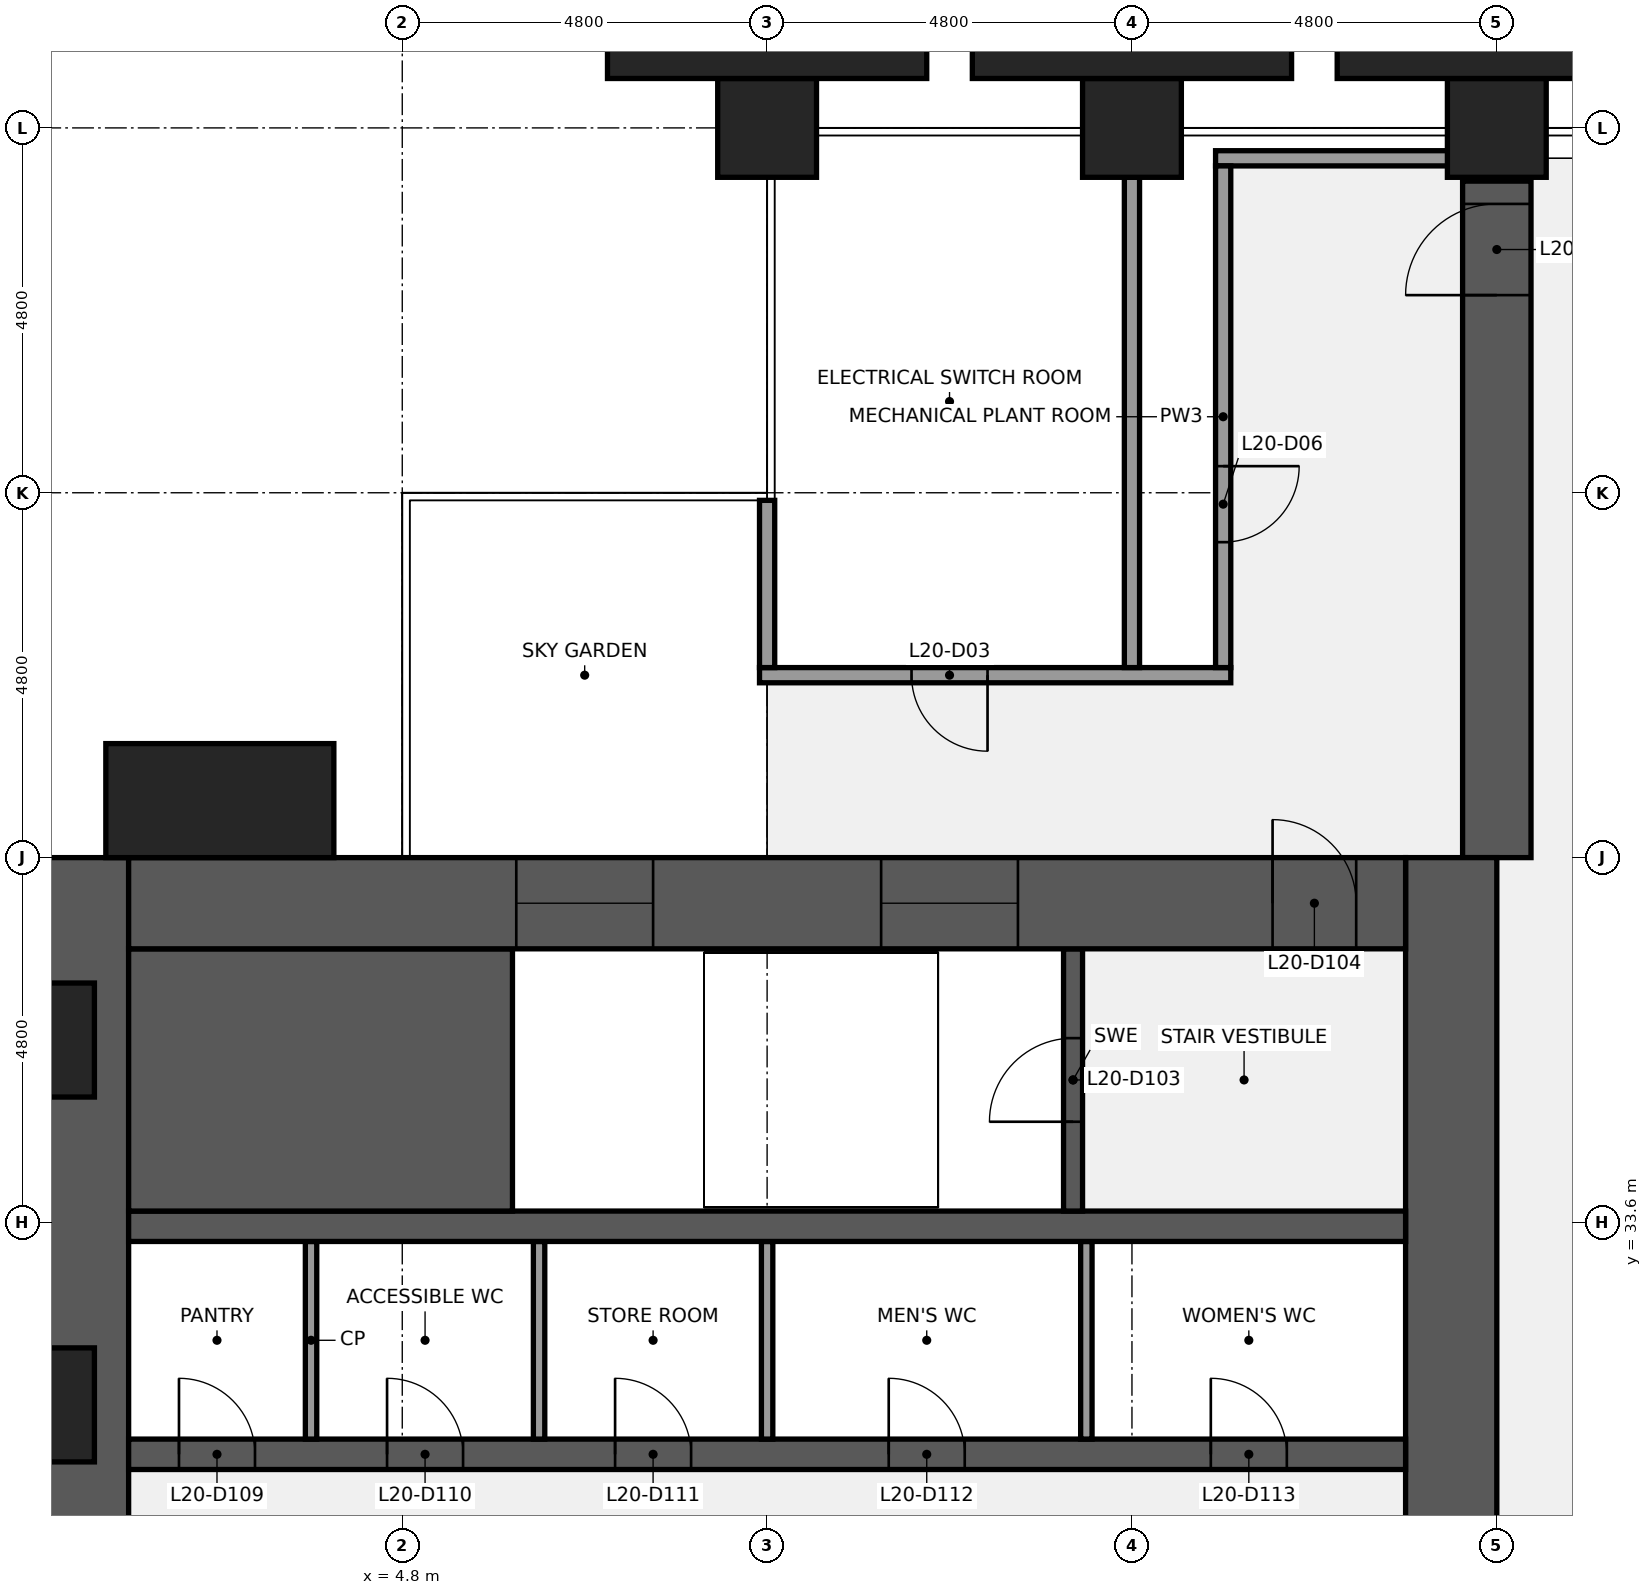
"""IFC4 building model, lengths in metres.
Left out: names, types, materials, properties, quantities, classifications, styles, units other than length and angle.
Written with IfcOpenShell. Run it as: python <this file> out.ifc"""

import sys

from ifc_helpers import new_model, si_unit, direction, frame, frame_2d, origin, origin_2d, place, context, subcontext, project, spatial, rectangle, extrude, element, fill, save


model = new_model("IFC4")
c1 = context("Model", 3, precision=1e-05, world=origin(), true_north=direction((0.0, 1.0)))
c2 = subcontext(c1, "Body", "Model", "MODEL_VIEW")
j1 = project(units=[si_unit("LENGTHUNIT", "METRE"), si_unit("PLANEANGLEUNIT", "RADIAN")], contexts=[c1])
p1 = place(None, origin())
s1 = spatial("IfcSite", under=j1, at=p1, CompositionType="ELEMENT")
p2 = place(p1, origin())
s2 = spatial("IfcBuilding", under=s1, at=p2, CompositionType="ELEMENT")
p3 = place(p2, frame((0.0, 0.0, 91.5)))
s3 = spatial("IfcBuildingStorey", under=s2, at=p3, CompositionType="ELEMENT", Elevation=91.5)
for number, where, z_axis, x_axis in (
    (1, (9.6, 48.0, 0.0), (0.0, 0.0, 1.0), (1.0, 0.0, 0.0)),
    (2, (14.4, 48.0, 0.0), (0.0, 0.0, 1.0), (1.0, 0.0, 0.0)),
    (3, (19.2, 48.0, 0.0), (0.0, 0.0, 1.0), (1.0, 0.0, 0.0)),
):
    element("IfcColumn", number, at=place(p3, frame(where, z_axis=z_axis, x_axis=x_axis)), inside=s3, PredefinedType="COLUMN", context=c2, shape_type="SweptSolid", body=[
        extrude(rectangle(XDim=1.3, YDim=1.3, at=origin_2d()), origin(), (0.0, 0.0, 1.0), 12.6),
    ])
p4 = place(p3, frame((19.2, 38.4, 0.0), z_axis=(0.0, 0.0, 1.0), x_axis=(0.0, 1.0, 0.0)))
e4 = element("IfcWall", 4, at=p4, inside=s3, PredefinedType="SHEAR", context=c2, shape_type="SweptSolid", body=[
    extrude(rectangle(XDim=8.9, YDim=0.9, at=frame_2d((4.45, 0.0))), origin(), (0.0, 0.0, 1.0), 12.3),
])
p5 = place(p4, frame((7.4, 0.0, 0.0)))
e5 = element("IfcOpeningElement", 5, at=p5, cuts=e4, PredefinedType="OPENING", context=c2, shape_type="SweptSolid", body=[
    extrude(rectangle(XDim=1.2, YDim=2.1, at=frame_2d((0.6, 1.05))), frame((0.0, 0.46, 0.0), z_axis=(0.0, -1.0, 0.0), x_axis=(1.0, 0.0, 0.0)), (0.0, 0.0, 1.0), 0.92),
])
p6 = place(p3, frame((0.6, 9.6, 0.0), z_axis=(0.0, 0.0, 1.0), x_axis=(0.0, 1.0, 0.0)))
e6 = element("IfcWall", 6, at=p6, inside=s3, PredefinedType="SHEAR", context=c2, shape_type="SweptSolid", body=[
    extrude(rectangle(XDim=28.8, YDim=1.2, at=frame_2d((14.4, 0.0))), origin(), (0.0, 0.0, 1.0), 12.3),
])
p7 = place(p6, frame((8.85, 0.0, 0.9)))
e7 = element("IfcOpeningElement", 7, at=p7, cuts=e6, PredefinedType="OPENING", context=c2, shape_type="SweptSolid", body=[
    extrude(rectangle(XDim=1.5, YDim=6.3, at=frame_2d((0.75, 3.15))), frame((0.0, 0.61, 0.0), z_axis=(0.0, -1.0, 0.0), x_axis=(1.0, 0.0, 0.0)), (0.0, 0.0, 1.0), 1.22),
])
p8 = place(p6, frame((18.45, 0.0, 0.9)))
e8 = element("IfcOpeningElement", 8, at=p8, cuts=e6, PredefinedType="OPENING", context=c2, shape_type="SweptSolid", body=[
    extrude(rectangle(XDim=1.5, YDim=6.3, at=frame_2d((0.75, 3.15))), frame((0.0, 0.61, 0.0), z_axis=(0.0, -1.0, 0.0), x_axis=(1.0, 0.0, 0.0)), (0.0, 0.0, 1.0), 1.22),
])
p9 = place(p3, frame((18.6, 38.4, 0.0), z_axis=(0.0, 0.0, 1.0), x_axis=(0.0, -1.0, 0.0)))
e9 = element("IfcWall", 9, at=p9, inside=s3, PredefinedType="SHEAR", context=c2, shape_type="SweptSolid", body=[
    extrude(rectangle(XDim=28.8, YDim=1.2, at=frame_2d((14.4, 0.0))), origin(), (0.0, 0.0, 1.0), 12.3),
])
p10 = place(p9, frame((18.3, 0.0, 0.0)))
e10 = element("IfcOpeningElement", 10, at=p10, cuts=e9, PredefinedType="OPENING", context=c2, shape_type="SweptSolid", body=[
    extrude(rectangle(XDim=1.8, YDim=2.1, at=frame_2d((0.9, 1.05))), frame((0.0, 0.61, 0.0), z_axis=(0.0, -1.0, 0.0), x_axis=(1.0, 0.0, 0.0)), (0.0, 0.0, 1.0), 1.22),
])
p11 = place(p9, frame((8.7, 0.0, 0.0)))
e11 = element("IfcOpeningElement", 11, at=p11, cuts=e9, PredefinedType="OPENING", context=c2, shape_type="SweptSolid", body=[
    extrude(rectangle(XDim=1.8, YDim=2.1, at=frame_2d((0.9, 1.05))), frame((0.0, 0.61, 0.0), z_axis=(0.0, -1.0, 0.0), x_axis=(1.0, 0.0, 0.0)), (0.0, 0.0, 1.0), 1.22),
])
p12 = place(p3, frame((1.2, 30.55, 0.0), z_axis=(0.0, 0.0, 1.0), x_axis=(1.0, 0.0, 0.0)))
e12 = element("IfcWall", 12, at=p12, inside=s3, PredefinedType="SHEAR", context=c2, shape_type="SweptSolid", body=[
    extrude(rectangle(XDim=16.8, YDim=0.4, at=frame_2d((8.4, 0.0))), origin(), (0.0, 0.0, 1.0), 12.3),
])
p13 = place(p12, frame((0.663, 0.0, 0.0)))
e13 = element("IfcOpeningElement", 13, at=p13, cuts=e12, PredefinedType="OPENING", context=c2, shape_type="SweptSolid", body=[
    extrude(rectangle(XDim=1.0, YDim=2.1, at=frame_2d((0.5, 1.05))), frame((0.0, 0.21, 0.0), z_axis=(0.0, -1.0, 0.0), x_axis=(1.0, 0.0, 0.0)), (0.0, 0.0, 1.0), 0.42),
])
p14 = place(p12, frame((3.4, 0.0, 0.0)))
e14 = element("IfcOpeningElement", 14, at=p14, cuts=e12, PredefinedType="OPENING", context=c2, shape_type="SweptSolid", body=[
    extrude(rectangle(XDim=1.0, YDim=2.1, at=frame_2d((0.5, 1.05))), frame((0.0, 0.21, 0.0), z_axis=(0.0, -1.0, 0.0), x_axis=(1.0, 0.0, 0.0)), (0.0, 0.0, 1.0), 0.42),
])
p15 = place(p12, frame((6.4, 0.0, 0.0)))
e15 = element("IfcOpeningElement", 15, at=p15, cuts=e12, PredefinedType="OPENING", context=c2, shape_type="SweptSolid", body=[
    extrude(rectangle(XDim=1.0, YDim=2.1, at=frame_2d((0.5, 1.05))), frame((0.0, 0.21, 0.0), z_axis=(0.0, -1.0, 0.0), x_axis=(1.0, 0.0, 0.0)), (0.0, 0.0, 1.0), 0.42),
])
p16 = place(p12, frame((10.0, 0.0, 0.0)))
e16 = element("IfcOpeningElement", 16, at=p16, cuts=e12, PredefinedType="OPENING", context=c2, shape_type="SweptSolid", body=[
    extrude(rectangle(XDim=1.0, YDim=2.1, at=frame_2d((0.5, 1.05))), frame((0.0, 0.21, 0.0), z_axis=(0.0, -1.0, 0.0), x_axis=(1.0, 0.0, 0.0)), (0.0, 0.0, 1.0), 0.42),
])
p17 = place(p12, frame((14.238, 0.0, 0.0)))
e17 = element("IfcOpeningElement", 17, at=p17, cuts=e12, PredefinedType="OPENING", context=c2, shape_type="SweptSolid", body=[
    extrude(rectangle(XDim=1.0, YDim=2.1, at=frame_2d((0.5, 1.05))), frame((0.0, 0.21, 0.0), z_axis=(0.0, -1.0, 0.0), x_axis=(1.0, 0.0, 0.0)), (0.0, 0.0, 1.0), 0.42),
])
for number, where, z_axis, x_axis in (
    (18, (3.6, 30.75, 0.0), (0.0, 0.0, 1.0), (0.0, 1.0, 0.0)),
    (19, (6.6, 30.75, 0.0), (0.0, 0.0, 1.0), (0.0, 1.0, 0.0)),
    (20, (9.6, 30.75, 0.0), (0.0, 0.0, 1.0), (0.0, 1.0, 0.0)),
    (21, (13.8, 30.75, 0.0), (0.0, 0.0, 1.0), (0.0, 1.0, 0.0)),
):
    element("IfcWall", number, at=place(p3, frame(where, z_axis=z_axis, x_axis=x_axis)), inside=s3, PredefinedType="PARTITIONING", context=c2, shape_type="SweptSolid", body=[
        extrude(rectangle(XDim=2.6, YDim=0.15, at=frame_2d((1.3, 0.0))), origin(), (0.0, 0.0, 1.0), 12.3),
    ])
p18 = place(p3, frame((1.2, 33.55, 0.0), z_axis=(0.0, 0.0, 1.0), x_axis=(1.0, 0.0, 0.0)))
e22 = element("IfcWall", 22, at=p18, inside=s3, PredefinedType="SHEAR", context=c2, shape_type="SweptSolid", body=[
    extrude(rectangle(XDim=16.8, YDim=0.4, at=frame_2d((8.4, 0.0))), origin(), (0.0, 0.0, 1.0), 12.3),
])
p19 = place(p3, frame((1.2, 35.475, 0.0), z_axis=(0.0, 0.0, 1.0), x_axis=(1.0, 0.0, 0.0)))
e23 = element("IfcWall", 23, at=p19, inside=s3, PredefinedType="SHEAR", context=c2, shape_type="SweptSolid", body=[
    extrude(rectangle(XDim=5.05, YDim=3.45, at=frame_2d((2.525, 0.0))), origin(), (0.0, 0.0, 1.0), 12.3),
])
p20 = place(p3, frame((13.625, 33.75, 0.0), z_axis=(0.0, 0.0, 1.0), x_axis=(0.0, 1.0, 0.0)))
e24 = element("IfcWall", 24, at=p20, inside=s3, PredefinedType="SHEAR", context=c2, shape_type="SweptSolid", body=[
    extrude(rectangle(XDim=3.45, YDim=0.25, at=frame_2d((1.725, 0.0))), origin(), (0.0, 0.0, 1.0), 12.3),
])
p21 = place(p20, frame((1.175, 0.0, 0.0)))
e25 = element("IfcOpeningElement", 25, at=p21, cuts=e24, PredefinedType="OPENING", context=c2, shape_type="SweptSolid", body=[
    extrude(rectangle(XDim=1.1, YDim=2.1, at=frame_2d((0.55, 1.05))), frame((0.0, 0.135, 0.0), z_axis=(0.0, -1.0, 0.0), x_axis=(1.0, 0.0, 0.0)), (0.0, 0.0, 1.0), 0.27),
])
p22 = place(p3, frame((1.2, 37.8, 0.0), z_axis=(0.0, 0.0, 1.0), x_axis=(1.0, 0.0, 0.0)))
e26 = element("IfcWall", 26, at=p22, inside=s3, PredefinedType="SHEAR", context=c2, shape_type="SweptSolid", body=[
    extrude(rectangle(XDim=16.8, YDim=1.2, at=frame_2d((8.4, 0.0))), origin(), (0.0, 0.0, 1.0), 12.3),
])
p23 = place(p22, frame((15.05, 0.0, 0.0)))
e27 = element("IfcOpeningElement", 27, at=p23, cuts=e26, PredefinedType="OPENING", context=c2, shape_type="SweptSolid", body=[
    extrude(rectangle(XDim=1.1, YDim=2.1, at=frame_2d((0.55, 1.05))), frame((0.0, 0.61, 0.0), z_axis=(0.0, -1.0, 0.0), x_axis=(1.0, 0.0, 0.0)), (0.0, 0.0, 1.0), 1.22),
])
p24 = place(p22, frame((5.1, 0.0, 0.9)))
e28 = element("IfcOpeningElement", 28, at=p24, cuts=e26, PredefinedType="OPENING", context=c2, shape_type="SweptSolid", body=[
    extrude(rectangle(XDim=1.8, YDim=1.5, at=frame_2d((0.9, 0.75))), frame((0.0, 0.61, 0.0), z_axis=(0.0, -1.0, 0.0), x_axis=(1.0, 0.0, 0.0)), (0.0, 0.0, 1.0), 1.22),
])
p25 = place(p22, frame((9.9, 0.0, 0.9)))
e29 = element("IfcOpeningElement", 29, at=p25, cuts=e26, PredefinedType="OPENING", context=c2, shape_type="SweptSolid", body=[
    extrude(rectangle(XDim=1.8, YDim=1.5, at=frame_2d((0.9, 0.75))), frame((0.0, 0.61, 0.0), z_axis=(0.0, -1.0, 0.0), x_axis=(1.0, 0.0, 0.0)), (0.0, 0.0, 1.0), 1.22),
])
p26 = place(p3, frame((9.5, 40.8, 0.0), z_axis=(0.0, 0.0, 1.0), x_axis=(1.0, 0.0, 0.0)))
e30 = element("IfcWall", 30, at=p26, inside=s3, PredefinedType="PARTITIONING", context=c2, shape_type="SweptSolid", body=[
    extrude(rectangle(XDim=6.2, YDim=0.2, at=frame_2d((3.1, 0.0))), origin(), (0.0, 0.0, 1.0), 11.309),
])
p27 = place(p26, frame((2.0, 0.0, 0.0)))
e31 = element("IfcOpeningElement", 31, at=p27, cuts=e30, PredefinedType="OPENING", context=c2, shape_type="SweptSolid", body=[
    extrude(rectangle(XDim=1.0, YDim=2.1, at=frame_2d((0.5, 1.05))), frame((0.0, 0.11, 0.0), z_axis=(0.0, -1.0, 0.0), x_axis=(1.0, 0.0, 0.0)), (0.0, 0.0, 1.0), 0.22),
])
p28 = place(p3, frame((15.5, 47.6, 0.0), z_axis=(0.0, 0.0, 1.0), x_axis=(1.0, 0.0, 0.0)))
e32 = element("IfcWall", 32, at=p28, inside=s3, PredefinedType="PARTITIONING", context=c2, shape_type="SweptSolid", body=[
    extrude(rectangle(XDim=3.8, YDim=0.2, at=frame_2d((1.9, 0.0))), origin(), (0.0, 0.0, 1.0), 11.309),
])
p29 = place(p3, frame((9.6, 40.9, 0.0), z_axis=(0.0, 0.0, 1.0), x_axis=(0.0, 1.0, 0.0)))
e33 = element("IfcWall", 33, at=p29, inside=s3, PredefinedType="PARTITIONING", context=c2, shape_type="SweptSolid", body=[
    extrude(rectangle(XDim=2.2, YDim=0.2, at=frame_2d((1.1, 0.0))), origin(), (0.0, 0.0, 1.0), 11.309),
])
p30 = place(p3, frame((14.4, 40.9, 0.0), z_axis=(0.0, 0.0, 1.0), x_axis=(0.0, 1.0, 0.0)))
e34 = element("IfcWall", 34, at=p30, inside=s3, PredefinedType="PARTITIONING", context=c2, shape_type="SweptSolid", body=[
    extrude(rectangle(XDim=6.45, YDim=0.2, at=frame_2d((3.225, 0.0))), origin(), (0.0, 0.0, 1.0), 11.309),
])
p31 = place(p3, frame((15.6, 40.9, 0.0), z_axis=(0.0, 0.0, 1.0), x_axis=(0.0, 1.0, 0.0)))
e35 = element("IfcWall", 35, at=p31, inside=s3, PredefinedType="PARTITIONING", context=c2, shape_type="SweptSolid", body=[
    extrude(rectangle(XDim=6.6, YDim=0.2, at=frame_2d((3.3, 0.0))), origin(), (0.0, 0.0, 1.0), 11.309),
])
p32 = place(p31, frame((1.65, 0.0, 0.0)))
e36 = element("IfcOpeningElement", 36, at=p32, cuts=e35, PredefinedType="OPENING", context=c2, shape_type="SweptSolid", body=[
    extrude(rectangle(XDim=1.0, YDim=2.1, at=frame_2d((0.5, 1.05))), frame((0.0, 0.11, 0.0), z_axis=(0.0, -1.0, 0.0), x_axis=(1.0, 0.0, 0.0)), (0.0, 0.0, 1.0), 0.22),
])
p33 = place(p3, frame((2.4, 39.15, 0.0), z_axis=(0.0, 0.0, 1.0), x_axis=(1.0, 0.0, 0.0)))
e37 = element("IfcColumn", 37, at=p33, inside=s3, PredefinedType="PILASTER", context=c2, shape_type="SweptSolid", body=[
    extrude(rectangle(XDim=3.0, YDim=1.5, at=origin_2d()), origin(), (0.0, 0.0, 1.0), 12.6),
])
for number, where, z_axis, x_axis in (
    (38, (9.6, 49.075, 0.0), (0.0, 0.0, 1.0), (1.0, 0.0, 0.0)),
    (39, (14.4, 49.075, 0.0), (0.0, 0.0, 1.0), (1.0, 0.0, 0.0)),
    (40, (19.2, 49.075, 0.0), (0.0, 0.0, 1.0), (1.0, 0.0, 0.0)),
):
    element("IfcColumn", number, at=place(p3, frame(where, z_axis=z_axis, x_axis=x_axis)), inside=s3, PredefinedType="PILASTER", context=c2, shape_type="SweptSolid", body=[
        extrude(rectangle(XDim=4.2, YDim=0.85, at=origin_2d()), origin(), (0.0, 0.0, 1.0), 12.6),
    ])
p34 = place(p21, origin())
e41 = element("IfcDoor", 41, at=p34, inside=s3, OperationType="SINGLE_SWING_LEFT", PredefinedType="DOOR", context=c2, shape_type="SweptSolid", body=[
    extrude(rectangle(XDim=1.1, YDim=2.1, at=frame_2d((0.55, 1.05))), frame((0.0, 0.025, 0.0), z_axis=(0.0, -1.0, 0.0), x_axis=(1.0, 0.0, 0.0)), (0.0, 0.0, 1.0), 0.05),
])
fill(e25, e41)
p35 = place(p23, origin())
e42 = element("IfcDoor", 42, at=p35, inside=s3, OperationType="SINGLE_SWING_LEFT", PredefinedType="DOOR", context=c2, shape_type="SweptSolid", body=[
    extrude(rectangle(XDim=1.1, YDim=2.1, at=frame_2d((0.55, 1.05))), frame((0.0, 0.025, 0.0), z_axis=(0.0, -1.0, 0.0), x_axis=(1.0, 0.0, 0.0)), (0.0, 0.0, 1.0), 0.05),
])
fill(e27, e42)
p36 = place(p13, origin())
e43 = element("IfcDoor", 43, at=p36, inside=s3, OperationType="SINGLE_SWING_LEFT", PredefinedType="DOOR", context=c2, shape_type="SweptSolid", body=[
    extrude(rectangle(XDim=1.0, YDim=2.1, at=frame_2d((0.5, 1.05))), frame((0.0, 0.025, 0.0), z_axis=(0.0, -1.0, 0.0), x_axis=(1.0, 0.0, 0.0)), (0.0, 0.0, 1.0), 0.05),
])
fill(e13, e43)
p37 = place(p14, origin())
e44 = element("IfcDoor", 44, at=p37, inside=s3, OperationType="SINGLE_SWING_LEFT", PredefinedType="DOOR", context=c2, shape_type="SweptSolid", body=[
    extrude(rectangle(XDim=1.0, YDim=2.1, at=frame_2d((0.5, 1.05))), frame((0.0, 0.025, 0.0), z_axis=(0.0, -1.0, 0.0), x_axis=(1.0, 0.0, 0.0)), (0.0, 0.0, 1.0), 0.05),
])
fill(e14, e44)
p38 = place(p15, origin())
e45 = element("IfcDoor", 45, at=p38, inside=s3, OperationType="SINGLE_SWING_LEFT", PredefinedType="DOOR", context=c2, shape_type="SweptSolid", body=[
    extrude(rectangle(XDim=1.0, YDim=2.1, at=frame_2d((0.5, 1.05))), frame((0.0, 0.025, 0.0), z_axis=(0.0, -1.0, 0.0), x_axis=(1.0, 0.0, 0.0)), (0.0, 0.0, 1.0), 0.05),
])
fill(e15, e45)
p39 = place(p16, origin())
e46 = element("IfcDoor", 46, at=p39, inside=s3, OperationType="SINGLE_SWING_LEFT", PredefinedType="DOOR", context=c2, shape_type="SweptSolid", body=[
    extrude(rectangle(XDim=1.0, YDim=2.1, at=frame_2d((0.5, 1.05))), frame((0.0, 0.025, 0.0), z_axis=(0.0, -1.0, 0.0), x_axis=(1.0, 0.0, 0.0)), (0.0, 0.0, 1.0), 0.05),
])
fill(e16, e46)
p40 = place(p17, origin())
e47 = element("IfcDoor", 47, at=p40, inside=s3, OperationType="SINGLE_SWING_LEFT", PredefinedType="DOOR", context=c2, shape_type="SweptSolid", body=[
    extrude(rectangle(XDim=1.0, YDim=2.1, at=frame_2d((0.5, 1.05))), frame((0.0, 0.025, 0.0), z_axis=(0.0, -1.0, 0.0), x_axis=(1.0, 0.0, 0.0)), (0.0, 0.0, 1.0), 0.05),
])
fill(e17, e47)
p41 = place(p24, origin())
e48 = element("IfcWindow", 48, at=p41, inside=s3, PartitioningType="SINGLE_PANEL", PredefinedType="WINDOW", context=c2, shape_type="SweptSolid", body=[
    extrude(rectangle(XDim=1.8, YDim=1.5, at=frame_2d((0.9, 0.75))), frame((0.0, 0.03, 0.0), z_axis=(0.0, -1.0, 0.0), x_axis=(1.0, 0.0, 0.0)), (0.0, 0.0, 1.0), 0.06),
])
fill(e28, e48)
p42 = place(p25, origin())
e49 = element("IfcWindow", 49, at=p42, inside=s3, PartitioningType="SINGLE_PANEL", PredefinedType="WINDOW", context=c2, shape_type="SweptSolid", body=[
    extrude(rectangle(XDim=1.8, YDim=1.5, at=frame_2d((0.9, 0.75))), frame((0.0, 0.03, 0.0), z_axis=(0.0, -1.0, 0.0), x_axis=(1.0, 0.0, 0.0)), (0.0, 0.0, 1.0), 0.06),
])
fill(e29, e49)
p43 = place(p27, origin())
e50 = element("IfcDoor", 50, at=p43, inside=s3, OperationType="SINGLE_SWING_RIGHT", PredefinedType="DOOR", context=c2, shape_type="SweptSolid", body=[
    extrude(rectangle(XDim=1.0, YDim=2.1, at=frame_2d((0.5, 1.05))), frame((0.0, 0.025, 0.0), z_axis=(0.0, -1.0, 0.0), x_axis=(1.0, 0.0, 0.0)), (0.0, 0.0, 1.0), 0.05),
])
fill(e31, e50)
p44 = place(p32, origin())
e51 = element("IfcDoor", 51, at=p44, inside=s3, OperationType="SINGLE_SWING_RIGHT", PredefinedType="DOOR", context=c2, shape_type="SweptSolid", body=[
    extrude(rectangle(XDim=1.0, YDim=2.1, at=frame_2d((0.5, 1.05))), frame((0.0, 0.025, 0.0), z_axis=(0.0, -1.0, 0.0), x_axis=(1.0, 0.0, 0.0)), (0.0, 0.0, 1.0), 0.05),
])
fill(e36, e51)
p45 = place(p5, origin())
e52 = element("IfcDoor", 52, at=p45, inside=s3, OperationType="SINGLE_SWING_LEFT", PredefinedType="DOOR", context=c2, shape_type="SweptSolid", body=[
    extrude(rectangle(XDim=1.2, YDim=2.1, at=frame_2d((0.6, 1.05))), frame((0.0, 0.025, 0.0), z_axis=(0.0, -1.0, 0.0), x_axis=(1.0, 0.0, 0.0)), (0.0, 0.0, 1.0), 0.05),
])
fill(e5, e52)
save(model, sys.argv[1])
